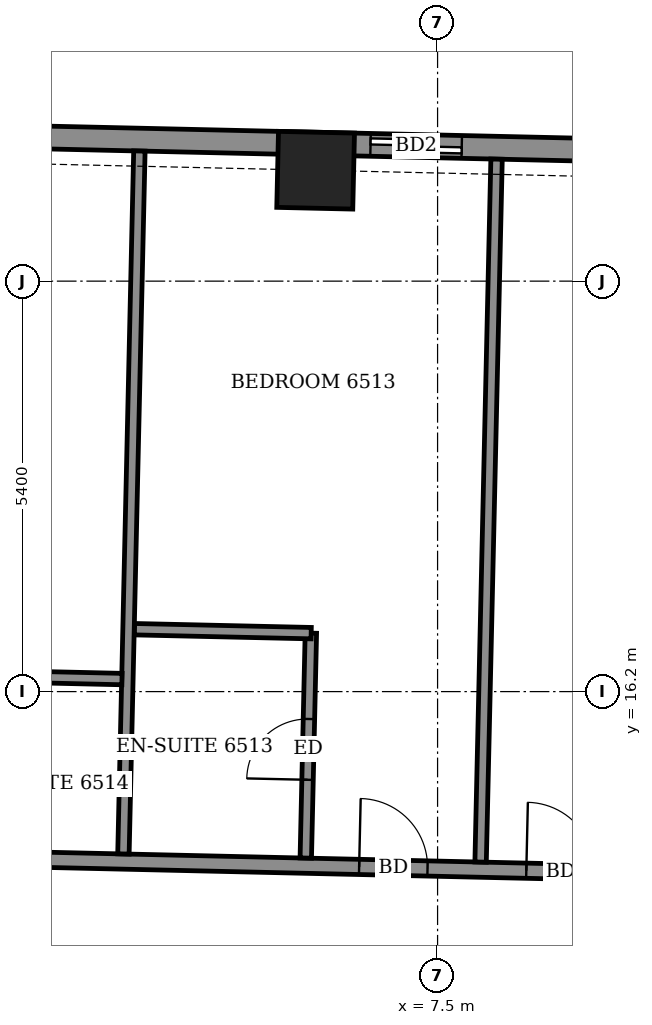
"""IFC4 building model, lengths in metres.
Left out: names, types, materials, properties, quantities, classifications, styles, units other than length and angle.
Written with IfcOpenShell. Run it as: python <this file> out.ifc"""

import sys

from ifc_helpers import new_model, si_unit, direction, frame, frame_2d, origin, origin_2d, place, context, subcontext, project, spatial, rectangle, extrude, element, fill, save


model = new_model("IFC4")
c1 = context("Model", 3, precision=1e-05, world=origin(), true_north=direction((0.0, 1.0)))
c2 = subcontext(c1, "Body", "Model", "MODEL_VIEW")
j1 = project(units=[si_unit("LENGTHUNIT", "METRE"), si_unit("PLANEANGLEUNIT", "RADIAN")], contexts=[c1])
p1 = place(None, origin())
s1 = spatial("IfcSite", under=j1, at=p1, CompositionType="ELEMENT")
p2 = place(p1, origin())
s2 = spatial("IfcBuilding", under=s1, at=p2, CompositionType="ELEMENT")
p3 = place(p2, frame((0.0, 0.0, 257.3)))
s3 = spatial("IfcBuildingStorey", under=s2, at=p3, CompositionType="ELEMENT", Elevation=257.3)
p4 = place(p3, frame((5.896, 23.059, -0.55), z_axis=(0.0, 0.0, 1.0), x_axis=(-0.999741948423, 0.022716438162, 0.0)))
e1 = element("IfcColumn", 1, at=p4, inside=s3, PredefinedType="COLUMN", context=c2, shape_type="SweptSolid", body=[
    extrude(rectangle(XDim=1.0, YDim=1.0, at=origin_2d()), origin(), (0.0, 0.0, 1.0), 3.6),
])
p5 = place(p3, frame((26.35, 22.945, 0.0), z_axis=(0.0, 0.0, 1.0), x_axis=(-0.999742523712, 0.022691105788, 0.0)))
e2 = element("IfcWall", 2, at=p5, inside=s3, PredefinedType="SOLIDWALL", context=c2, shape_type="SweptSolid", body=[
    extrude(rectangle(XDim=47.771, YDim=0.3, at=frame_2d((23.886, 0.0))), origin(), (0.0, 0.0, 1.0), 2.55),
])
p6 = place(p5, frame((1.578, 0.0, 0.0)))
e3 = element("IfcOpeningElement", 3, at=p6, cuts=e2, PredefinedType="OPENING", context=c2, shape_type="SweptSolid", body=[
    extrude(rectangle(XDim=1.5, YDim=2.4, at=frame_2d((0.75, 1.2))), frame((0.0, 0.16, 0.0), z_axis=(0.0, -1.0, 0.0), x_axis=(1.0, 0.0, 0.0)), (0.0, 0.0, 1.0), 0.32),
])
p7 = place(p5, frame((4.545, 0.0, 0.0)))
e4 = element("IfcOpeningElement", 4, at=p7, cuts=e2, PredefinedType="OPENING", context=c2, shape_type="SweptSolid", body=[
    extrude(rectangle(XDim=1.5, YDim=2.4, at=frame_2d((0.75, 1.2))), frame((0.0, 0.16, 0.0), z_axis=(0.0, -1.0, 0.0), x_axis=(1.0, 0.0, 0.0)), (0.0, 0.0, 1.0), 0.32),
])
p8 = place(p5, frame((10.354, 0.0, 0.0)))
e5 = element("IfcOpeningElement", 5, at=p8, cuts=e2, PredefinedType="OPENING", context=c2, shape_type="SweptSolid", body=[
    extrude(rectangle(XDim=1.5, YDim=2.4, at=frame_2d((0.75, 1.2))), frame((0.0, 0.16, 0.0), z_axis=(0.0, -1.0, 0.0), x_axis=(1.0, 0.0, 0.0)), (0.0, 0.0, 1.0), 0.32),
])
p9 = place(p5, frame((15.204, 0.0, 0.0)))
e6 = element("IfcOpeningElement", 6, at=p9, cuts=e2, PredefinedType="OPENING", context=c2, shape_type="SweptSolid", body=[
    extrude(rectangle(XDim=1.5, YDim=2.4, at=frame_2d((0.75, 1.2))), frame((0.0, 0.16, 0.0), z_axis=(0.0, -1.0, 0.0), x_axis=(1.0, 0.0, 0.0)), (0.0, 0.0, 1.0), 0.32),
])
p10 = place(p5, frame((18.537, 0.0, 0.0)))
e7 = element("IfcOpeningElement", 7, at=p10, cuts=e2, PredefinedType="OPENING", context=c2, shape_type="SweptSolid", body=[
    extrude(rectangle(XDim=1.2, YDim=2.4, at=frame_2d((0.6, 1.2))), frame((0.0, 0.16, 0.0), z_axis=(0.0, -1.0, 0.0), x_axis=(1.0, 0.0, 0.0)), (0.0, 0.0, 1.0), 0.32),
])
p11 = place(p5, frame((24.171, 0.0, 0.0)))
e8 = element("IfcOpeningElement", 8, at=p11, cuts=e2, PredefinedType="OPENING", context=c2, shape_type="SweptSolid", body=[
    extrude(rectangle(XDim=1.5, YDim=2.4, at=frame_2d((0.75, 1.2))), frame((0.0, 0.16, 0.0), z_axis=(0.0, -1.0, 0.0), x_axis=(1.0, 0.0, 0.0)), (0.0, 0.0, 1.0), 0.32),
])
p12 = place(p5, frame((28.871, 0.0, 0.0)))
e9 = element("IfcOpeningElement", 9, at=p12, cuts=e2, PredefinedType="OPENING", context=c2, shape_type="SweptSolid", body=[
    extrude(rectangle(XDim=1.5, YDim=2.4, at=frame_2d((0.75, 1.2))), frame((0.0, 0.16, 0.0), z_axis=(0.0, -1.0, 0.0), x_axis=(1.0, 0.0, 0.0)), (0.0, 0.0, 1.0), 0.32),
])
p13 = place(p5, frame((32.055, 0.0, 0.0)))
e10 = element("IfcOpeningElement", 10, at=p13, cuts=e2, PredefinedType="OPENING", context=c2, shape_type="SweptSolid", body=[
    extrude(rectangle(XDim=1.5, YDim=2.4, at=frame_2d((0.75, 1.2))), frame((0.0, 0.16, 0.0), z_axis=(0.0, -1.0, 0.0), x_axis=(1.0, 0.0, 0.0)), (0.0, 0.0, 1.0), 0.32),
])
p14 = place(p5, frame((37.813, 0.0, 0.0)))
e11 = element("IfcOpeningElement", 11, at=p14, cuts=e2, PredefinedType="OPENING", context=c2, shape_type="SweptSolid", body=[
    extrude(rectangle(XDim=1.5, YDim=2.4, at=frame_2d((0.75, 1.2))), frame((0.0, 0.16, 0.0), z_axis=(0.0, -1.0, 0.0), x_axis=(1.0, 0.0, 0.0)), (0.0, 0.0, 1.0), 0.32),
])
p15 = place(p5, frame((43.052, 0.0, 0.9)))
e12 = element("IfcOpeningElement", 12, at=p15, cuts=e2, PredefinedType="OPENING", context=c2, shape_type="SweptSolid", body=[
    extrude(rectangle(XDim=2.4, YDim=1.5, at=frame_2d((1.2, 0.75))), frame((0.0, 0.16, 0.0), z_axis=(0.0, -1.0, 0.0), x_axis=(1.0, 0.0, 0.0)), (0.0, 0.0, 1.0), 0.32),
])
p16 = place(p3, frame((-24.474, 14.596, 0.0), z_axis=(0.0, 0.0, 1.0), x_axis=(0.999742424031, -0.022695497208, 0.0)))
e13 = element("IfcWall", 13, at=p16, inside=s3, PredefinedType="PARTITIONING", context=c2, shape_type="SweptSolid", body=[
    extrude(rectangle(XDim=52.872, YDim=0.2, at=frame_2d((26.436, 0.0))), origin(), (0.0, 0.0, 1.0), 3.05),
])
p17 = place(p16, frame((51.336, 0.0, 0.0)))
e14 = element("IfcOpeningElement", 14, at=p17, cuts=e13, PredefinedType="OPENING", context=c2, shape_type="SweptSolid", body=[
    extrude(rectangle(XDim=1.0, YDim=2.1, at=frame_2d((0.5, 1.05))), frame((0.0, 0.11, 0.0), z_axis=(0.0, -1.0, 0.0), x_axis=(1.0, 0.0, 0.0)), (0.0, 0.0, 1.0), 0.22),
])
p18 = place(p16, frame((47.25, 0.0, 0.0)))
e15 = element("IfcOpeningElement", 15, at=p18, cuts=e13, PredefinedType="OPENING", context=c2, shape_type="SweptSolid", body=[
    extrude(rectangle(XDim=0.9, YDim=2.1, at=frame_2d((0.45, 1.05))), frame((0.0, 0.11, 0.0), z_axis=(0.0, -1.0, 0.0), x_axis=(1.0, 0.0, 0.0)), (0.0, 0.0, 1.0), 0.22),
])
p19 = place(p16, frame((42.475, 0.0, 0.0)))
e16 = element("IfcOpeningElement", 16, at=p19, cuts=e13, PredefinedType="OPENING", context=c2, shape_type="SweptSolid", body=[
    extrude(rectangle(XDim=0.9, YDim=2.1, at=frame_2d((0.45, 1.05))), frame((0.0, 0.11, 0.0), z_axis=(0.0, -1.0, 0.0), x_axis=(1.0, 0.0, 0.0)), (0.0, 0.0, 1.0), 0.22),
])
p20 = place(p16, frame((40.15, 0.0, 0.0)))
e17 = element("IfcOpeningElement", 17, at=p20, cuts=e13, PredefinedType="OPENING", context=c2, shape_type="SweptSolid", body=[
    extrude(rectangle(XDim=0.9, YDim=2.1, at=frame_2d((0.45, 1.05))), frame((0.0, 0.11, 0.0), z_axis=(0.0, -1.0, 0.0), x_axis=(1.0, 0.0, 0.0)), (0.0, 0.0, 1.0), 0.22),
])
p21 = place(p16, frame((33.15, 0.0, 0.0)))
e18 = element("IfcOpeningElement", 18, at=p21, cuts=e13, PredefinedType="OPENING", context=c2, shape_type="SweptSolid", body=[
    extrude(rectangle(XDim=0.9, YDim=2.1, at=frame_2d((0.45, 1.05))), frame((0.0, 0.11, 0.0), z_axis=(0.0, -1.0, 0.0), x_axis=(1.0, 0.0, 0.0)), (0.0, 0.0, 1.0), 0.22),
])
p22 = place(p16, frame((30.95, 0.0, 0.0)))
e19 = element("IfcOpeningElement", 19, at=p22, cuts=e13, PredefinedType="OPENING", context=c2, shape_type="SweptSolid", body=[
    extrude(rectangle(XDim=0.9, YDim=2.1, at=frame_2d((0.45, 1.05))), frame((0.0, 0.11, 0.0), z_axis=(0.0, -1.0, 0.0), x_axis=(1.0, 0.0, 0.0)), (0.0, 0.0, 1.0), 0.22),
])
p23 = place(p16, frame((23.975, 0.0, 0.0)))
e20 = element("IfcOpeningElement", 20, at=p23, cuts=e13, PredefinedType="OPENING", context=c2, shape_type="SweptSolid", body=[
    extrude(rectangle(XDim=0.9, YDim=2.1, at=frame_2d((0.45, 1.05))), frame((0.0, 0.11, 0.0), z_axis=(0.0, -1.0, 0.0), x_axis=(1.0, 0.0, 0.0)), (0.0, 0.0, 1.0), 0.22),
])
p24 = place(p16, frame((21.925, 0.0, 0.0)))
e21 = element("IfcOpeningElement", 21, at=p24, cuts=e13, PredefinedType="OPENING", context=c2, shape_type="SweptSolid", body=[
    extrude(rectangle(XDim=0.9, YDim=2.1, at=frame_2d((0.45, 1.05))), frame((0.0, 0.11, 0.0), z_axis=(0.0, -1.0, 0.0), x_axis=(1.0, 0.0, 0.0)), (0.0, 0.0, 1.0), 0.22),
])
p25 = place(p16, frame((14.975, 0.0, 0.0)))
e22 = element("IfcOpeningElement", 22, at=p25, cuts=e13, PredefinedType="OPENING", context=c2, shape_type="SweptSolid", body=[
    extrude(rectangle(XDim=0.9, YDim=2.1, at=frame_2d((0.45, 1.05))), frame((0.0, 0.11, 0.0), z_axis=(0.0, -1.0, 0.0), x_axis=(1.0, 0.0, 0.0)), (0.0, 0.0, 1.0), 0.22),
])
p26 = place(p16, frame((12.65, 0.0, 0.0)))
e23 = element("IfcOpeningElement", 23, at=p26, cuts=e13, PredefinedType="OPENING", context=c2, shape_type="SweptSolid", body=[
    extrude(rectangle(XDim=0.9, YDim=2.1, at=frame_2d((0.45, 1.05))), frame((0.0, 0.11, 0.0), z_axis=(0.0, -1.0, 0.0), x_axis=(1.0, 0.0, 0.0)), (0.0, 0.0, 1.0), 0.22),
])
p27 = place(p16, frame((2.0, 0.0, 0.0)))
e24 = element("IfcOpeningElement", 24, at=p27, cuts=e13, PredefinedType="OPENING", context=c2, shape_type="SweptSolid", body=[
    extrude(rectangle(XDim=1.0, YDim=2.1, at=frame_2d((0.5, 1.05))), frame((0.0, 0.11, 0.0), z_axis=(0.0, -1.0, 0.0), x_axis=(1.0, 0.0, 0.0)), (0.0, 0.0, 1.0), 0.22),
])
p28 = place(p16, frame((7.75, 0.0, 0.0)))
e25 = element("IfcOpeningElement", 25, at=p28, cuts=e13, PredefinedType="OPENING", context=c2, shape_type="SweptSolid", body=[
    extrude(rectangle(XDim=0.9, YDim=2.1, at=frame_2d((0.45, 1.05))), frame((0.0, 0.11, 0.0), z_axis=(0.0, -1.0, 0.0), x_axis=(1.0, 0.0, 0.0)), (0.0, 0.0, 1.0), 0.22),
])
p29 = place(p3, frame((3.367, 14.064, 0.0), z_axis=(0.0, 0.0, 1.0), x_axis=(0.022697424684, 0.999742380272, 0.0)))
e26 = element("IfcWall", 26, at=p29, inside=s3, PredefinedType="PARTITIONING", context=c2, shape_type="SweptSolid", body=[
    extrude(rectangle(XDim=9.25, YDim=0.15, at=frame_2d((4.625, 0.0))), origin(), (0.0, 0.0, 1.0), 2.55),
])
p30 = place(p3, frame((5.766, 14.01, 0.0), z_axis=(0.0, 0.0, 1.0), x_axis=(0.022601485787, 0.999744553794, 0.0)))
e27 = element("IfcWall", 27, at=p30, inside=s3, PredefinedType="PARTITIONING", context=c2, shape_type="SweptSolid", body=[
    extrude(rectangle(XDim=2.96, YDim=0.15, at=frame_2d((1.48, 0.0))), origin(), (0.0, 0.0, 1.0), 3.05),
])
p31 = place(p30, frame((1.03, 0.0, 0.0)))
e28 = element("IfcOpeningElement", 28, at=p31, cuts=e27, PredefinedType="OPENING", context=c2, shape_type="SweptSolid", body=[
    extrude(rectangle(XDim=0.8, YDim=2.1, at=frame_2d((0.4, 1.05))), frame((0.0, 0.085, 0.0), z_axis=(0.0, -1.0, 0.0), x_axis=(1.0, 0.0, 0.0)), (0.0, 0.0, 1.0), 0.17),
])
p32 = place(p3, frame((8.066, 13.957, 0.0), z_axis=(0.0, 0.0, 1.0), x_axis=(0.022697424684, 0.999742380272, 0.0)))
e29 = element("IfcWall", 29, at=p32, inside=s3, PredefinedType="PARTITIONING", context=c2, shape_type="SweptSolid", body=[
    extrude(rectangle(XDim=9.25, YDim=0.15, at=frame_2d((4.625, 0.0))), origin(), (0.0, 0.0, 1.0), 2.55),
])
for number, where, z_axis, x_axis in (
    (30, (1.024, 16.418, 0.0), (0.0, 0.0, 1.0), (1.0, -0.023, 0.0)),
    (31, (3.513, 17.021, 0.0), (0.0, 0.0, 1.0), (1.0, -0.022, 0.0)),
):
    element("IfcWall", number, at=place(p3, frame(where, z_axis=z_axis, x_axis=x_axis)), inside=s3, PredefinedType="PARTITIONING", context=c2, shape_type="SweptSolid", body=[
        extrude(rectangle(XDim=2.324, YDim=0.15, at=frame_2d((1.162, 0.0))), origin(), (0.0, 0.0, 1.0), 3.05),
    ])
p33 = place(p10, origin())
e32 = element("IfcDoor", 32, at=p33, inside=s3, OperationType="SLIDING_TO_LEFT", PredefinedType="DOOR", context=c2, shape_type="SweptSolid", body=[
    extrude(rectangle(XDim=1.2, YDim=2.4, at=frame_2d((0.6, 1.2))), frame((0.0, 0.025, 0.0), z_axis=(0.0, -1.0, 0.0), x_axis=(1.0, 0.0, 0.0)), (0.0, 0.0, 1.0), 0.05),
])
fill(e7, e32)
p34 = place(p21, origin())
e33 = element("IfcDoor", 33, at=p34, inside=s3, OperationType="SINGLE_SWING_RIGHT", PredefinedType="DOOR", context=c2, shape_type="SweptSolid", body=[
    extrude(rectangle(XDim=0.9, YDim=2.1, at=frame_2d((0.45, 1.05))), frame((0.0, 0.025, 0.0), z_axis=(0.0, -1.0, 0.0), x_axis=(1.0, 0.0, 0.0)), (0.0, 0.0, 1.0), 0.05),
])
fill(e18, e33)
p35 = place(p22, origin())
e34 = element("IfcDoor", 34, at=p35, inside=s3, OperationType="SINGLE_SWING_LEFT", PredefinedType="DOOR", context=c2, shape_type="SweptSolid", body=[
    extrude(rectangle(XDim=0.9, YDim=2.1, at=frame_2d((0.45, 1.05))), frame((0.0, 0.025, 0.0), z_axis=(0.0, -1.0, 0.0), x_axis=(1.0, 0.0, 0.0)), (0.0, 0.0, 1.0), 0.05),
])
fill(e19, e34)
p36 = place(p31, origin())
e35 = element("IfcDoor", 35, at=p36, inside=s3, OperationType="SINGLE_SWING_LEFT", PredefinedType="DOOR", context=c2, shape_type="SweptSolid", body=[
    extrude(rectangle(XDim=0.8, YDim=2.1, at=frame_2d((0.4, 1.05))), frame((0.0, 0.025, 0.0), z_axis=(0.0, -1.0, 0.0), x_axis=(1.0, 0.0, 0.0)), (0.0, 0.0, 1.0), 0.05),
])
fill(e28, e35)
save(model, sys.argv[1])
